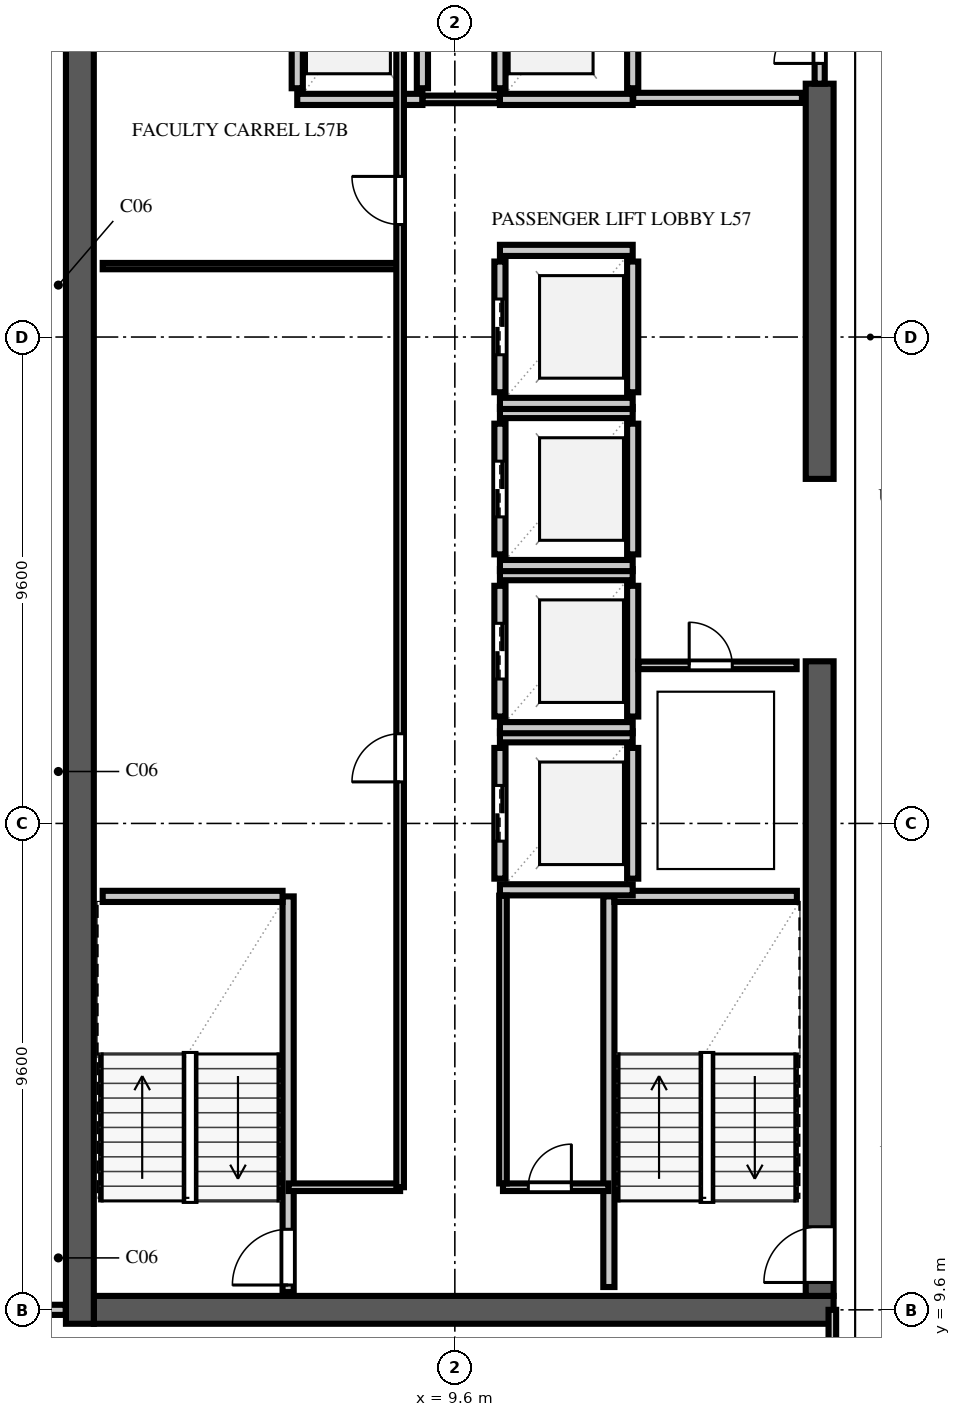
"""IFC4 building model, lengths in metres.
Left out: names, types, materials, properties, quantities, classifications, styles, units other than length and angle.
Written with IfcOpenShell. Run it as: python <this file> out.ifc"""

import sys

from ifc_helpers import new_model, si_unit, direction, frame, frame_2d, origin, place, context, subcontext, project, spatial, rectangle, extrude, element, fill, save


model = new_model("IFC4")
c1 = context("Model", 3, precision=1e-05, world=origin(), true_north=direction((0.0, 1.0)))
c2 = subcontext(c1, "Body", "Model", "MODEL_VIEW")
j1 = project(units=[si_unit("LENGTHUNIT", "METRE"), si_unit("PLANEANGLEUNIT", "RADIAN")], contexts=[c1])
p1 = place(None, origin())
s1 = spatial("IfcSite", under=j1, at=p1, CompositionType="ELEMENT")
p2 = place(p1, origin())
s2 = spatial("IfcBuilding", under=s1, at=p2, CompositionType="ELEMENT")
p3 = place(p2, frame((0.0, 0.0, 225.6)))
s3 = spatial("IfcBuildingStorey", under=s2, at=p3, CompositionType="ELEMENT", Elevation=225.6)
p4 = place(p3, frame((2.475, 9.6, 0.0), z_axis=(0.0, 0.0, 1.0), x_axis=(1.0, 0.0, 0.0)))
e1 = element("IfcWall", 1, at=p4, inside=s3, PredefinedType="SHEAR", context=c2, shape_type="SweptSolid", body=[
    extrude(rectangle(XDim=14.6, YDim=0.55, at=frame_2d((7.3, 0.0))), origin(), (0.0, 0.0, 1.0), 3.54),
])
p5 = place(p3, frame((2.2, 9.325, 0.0), z_axis=(0.0, 0.0, 1.0), x_axis=(0.0, 1.0, 0.0)))
e2 = element("IfcWall", 2, at=p5, inside=s3, PredefinedType="SHEAR", context=c2, shape_type="SweptSolid", body=[
    extrude(rectangle(XDim=38.95, YDim=0.55, at=frame_2d((19.475, 0.0))), origin(), (0.0, 0.0, 1.0), 3.54),
])
p6 = place(p3, frame((16.8, 9.875, 0.0), z_axis=(0.0, 0.0, 1.0), x_axis=(0.0, 1.0, 0.0)))
e3 = element("IfcWall", 3, at=p6, inside=s3, PredefinedType="SHEAR", context=c2, shape_type="SweptSolid", body=[
    extrude(rectangle(XDim=12.525, YDim=0.55, at=frame_2d((6.262, 0.0))), origin(), (0.0, 0.0, 1.0), 3.54),
])
p7 = place(p6, frame((0.265, 0.0, 0.0)))
e4 = element("IfcOpeningElement", 4, at=p7, cuts=e3, PredefinedType="OPENING", context=c2, shape_type="SweptSolid", body=[
    extrude(rectangle(XDim=1.1, YDim=2.2, at=frame_2d((0.55, 1.1))), frame((0.0, 0.287, 0.0), z_axis=(0.0, -1.0, 0.0), x_axis=(1.0, 0.0, 0.0)), (0.0, 0.0, 1.0), 0.574),
])
p8 = place(p3, frame((16.8, 26.0, 0.0), z_axis=(0.0, 0.0, 1.0), x_axis=(0.0, 1.0, 0.0)))
e5 = element("IfcWall", 5, at=p8, inside=s3, PredefinedType="SHEAR", context=c2, shape_type="SweptSolid", body=[
    extrude(rectangle(XDim=7.8, YDim=0.55, at=frame_2d((3.9, 0.0))), origin(), (0.0, 0.0, 1.0), 3.54),
])
p9 = place(p3, frame((6.31, 9.95, 0.0), z_axis=(0.0, 0.0, 1.0), x_axis=(0.0, 1.0, 0.0)))
e6 = element("IfcWall", 6, at=p9, inside=s3, PredefinedType="SOLIDWALL", context=c2, shape_type="SweptSolid", body=[
    extrude(rectangle(XDim=7.81, YDim=0.22, at=frame_2d((3.905, 0.0))), origin(), (0.0, 0.0, 1.0), 3.54),
])
p10 = place(p9, frame((0.14, 0.0, 0.0)))
e7 = element("IfcOpeningElement", 7, at=p10, cuts=e6, PredefinedType="OPENING", context=c2, shape_type="SweptSolid", body=[
    extrude(rectangle(XDim=1.1, YDim=2.2, at=frame_2d((0.55, 1.1))), frame((0.0, 0.122, 0.0), z_axis=(0.0, -1.0, 0.0), x_axis=(1.0, 0.0, 0.0)), (0.0, 0.0, 1.0), 0.244),
])
p11 = place(p3, frame((2.65, 17.76, 0.0), z_axis=(0.0, 0.0, 1.0), x_axis=(1.0, 0.0, 0.0)))
e8 = element("IfcWall", 8, at=p11, inside=s3, PredefinedType="SOLIDWALL", context=c2, shape_type="SweptSolid", body=[
    extrude(rectangle(XDim=3.55, YDim=0.22, at=frame_2d((1.775, 0.0))), origin(), (0.0, 0.0, 1.0), 3.54),
])
p12 = place(p3, frame((12.64, 10.05, 0.0), z_axis=(0.0, 0.0, 1.0), x_axis=(0.0, 1.0, 0.0)))
e9 = element("IfcWall", 9, at=p12, inside=s3, PredefinedType="SOLIDWALL", context=c2, shape_type="SweptSolid", body=[
    extrude(rectangle(XDim=7.71, YDim=0.22, at=frame_2d((3.855, 0.0))), origin(), (0.0, 0.0, 1.0), 3.54),
])
p13 = place(p3, frame((12.75, 17.76, 0.0), z_axis=(0.0, 0.0, 1.0), x_axis=(1.0, 0.0, 0.0)))
e10 = element("IfcWall", 10, at=p13, inside=s3, PredefinedType="SOLIDWALL", context=c2, shape_type="SweptSolid", body=[
    extrude(rectangle(XDim=3.6, YDim=0.22, at=frame_2d((1.8, 0.0))), origin(), (0.0, 0.0, 1.0), 3.54),
])
p14 = place(p3, frame((10.49, 18.11, 0.0), z_axis=(0.0, 0.0, 1.0), x_axis=(0.0, 1.0, 0.0)))
e11 = element("IfcWall", 11, at=p14, inside=s3, PredefinedType="SOLIDWALL", context=c2, shape_type="SweptSolid", body=[
    extrude(rectangle(XDim=2.58, YDim=0.22, at=frame_2d((1.29, 0.0))), origin(), (0.0, 0.0, 1.0), 3.54),
])
p15 = place(p14, frame((0.74, 0.0, 0.0)))
e12 = element("IfcOpeningElement", 12, at=p15, cuts=e11, PredefinedType="OPENING", context=c2, shape_type="SweptSolid", body=[
    extrude(rectangle(XDim=1.1, YDim=2.2, at=frame_2d((0.55, 1.1))), frame((0.0, 0.122, 0.0), z_axis=(0.0, -1.0, 0.0), x_axis=(1.0, 0.0, 0.0)), (0.0, 0.0, 1.0), 0.244),
])
p16 = place(p3, frame((13.11, 18.11, 0.0), z_axis=(0.0, 0.0, 1.0), x_axis=(0.0, 1.0, 0.0)))
e13 = element("IfcWall", 13, at=p16, inside=s3, PredefinedType="SOLIDWALL", context=c2, shape_type="SweptSolid", body=[
    extrude(rectangle(XDim=2.58, YDim=0.22, at=frame_2d((1.29, 0.0))), origin(), (0.0, 0.0, 1.0), 3.54),
])
for number, where, z_axis, x_axis in (
    (14, (10.49, 17.89, 0.0), (0.0, 0.0, 1.0), (1.0, 0.0, 0.0)),
    (15, (10.49, 20.91, 0.0), (0.0, 0.0, 1.0), (1.0, 0.0, 0.0)),
):
    element("IfcWall", number, at=place(p3, frame(where, z_axis=z_axis, x_axis=x_axis)), inside=s3, PredefinedType="SOLIDWALL", context=c2, shape_type="SweptSolid", body=[
        extrude(rectangle(XDim=2.62, YDim=0.22, at=frame_2d((1.31, 0.0))), origin(), (0.0, 0.0, 1.0), 3.54),
    ])
p17 = place(p3, frame((10.49, 21.31, 0.0), z_axis=(0.0, 0.0, 1.0), x_axis=(0.0, 1.0, 0.0)))
e16 = element("IfcWall", 16, at=p17, inside=s3, PredefinedType="SOLIDWALL", context=c2, shape_type="SweptSolid", body=[
    extrude(rectangle(XDim=2.58, YDim=0.22, at=frame_2d((1.29, 0.0))), origin(), (0.0, 0.0, 1.0), 3.54),
])
p18 = place(p17, frame((0.74, 0.0, 0.0)))
e17 = element("IfcOpeningElement", 17, at=p18, cuts=e16, PredefinedType="OPENING", context=c2, shape_type="SweptSolid", body=[
    extrude(rectangle(XDim=1.1, YDim=2.2, at=frame_2d((0.55, 1.1))), frame((0.0, 0.122, 0.0), z_axis=(0.0, -1.0, 0.0), x_axis=(1.0, 0.0, 0.0)), (0.0, 0.0, 1.0), 0.244),
])
p19 = place(p3, frame((13.11, 21.31, 0.0), z_axis=(0.0, 0.0, 1.0), x_axis=(0.0, 1.0, 0.0)))
e18 = element("IfcWall", 18, at=p19, inside=s3, PredefinedType="SOLIDWALL", context=c2, shape_type="SweptSolid", body=[
    extrude(rectangle(XDim=2.58, YDim=0.22, at=frame_2d((1.29, 0.0))), origin(), (0.0, 0.0, 1.0), 3.54),
])
for number, where, z_axis, x_axis in (
    (19, (10.49, 21.09, 0.0), (0.0, 0.0, 1.0), (1.0, 0.0, 0.0)),
    (20, (10.49, 24.11, 0.0), (0.0, 0.0, 1.0), (1.0, 0.0, 0.0)),
):
    element("IfcWall", number, at=place(p3, frame(where, z_axis=z_axis, x_axis=x_axis)), inside=s3, PredefinedType="SOLIDWALL", context=c2, shape_type="SweptSolid", body=[
        extrude(rectangle(XDim=2.62, YDim=0.22, at=frame_2d((1.31, 0.0))), origin(), (0.0, 0.0, 1.0), 3.54),
    ])
p20 = place(p3, frame((10.49, 24.51, 0.0), z_axis=(0.0, 0.0, 1.0), x_axis=(0.0, 1.0, 0.0)))
e21 = element("IfcWall", 21, at=p20, inside=s3, PredefinedType="SOLIDWALL", context=c2, shape_type="SweptSolid", body=[
    extrude(rectangle(XDim=2.58, YDim=0.22, at=frame_2d((1.29, 0.0))), origin(), (0.0, 0.0, 1.0), 3.54),
])
p21 = place(p20, frame((0.74, 0.0, 0.0)))
e22 = element("IfcOpeningElement", 22, at=p21, cuts=e21, PredefinedType="OPENING", context=c2, shape_type="SweptSolid", body=[
    extrude(rectangle(XDim=1.1, YDim=2.2, at=frame_2d((0.55, 1.1))), frame((0.0, 0.122, 0.0), z_axis=(0.0, -1.0, 0.0), x_axis=(1.0, 0.0, 0.0)), (0.0, 0.0, 1.0), 0.244),
])
p22 = place(p3, frame((13.11, 24.51, 0.0), z_axis=(0.0, 0.0, 1.0), x_axis=(0.0, 1.0, 0.0)))
e23 = element("IfcWall", 23, at=p22, inside=s3, PredefinedType="SOLIDWALL", context=c2, shape_type="SweptSolid", body=[
    extrude(rectangle(XDim=2.58, YDim=0.22, at=frame_2d((1.29, 0.0))), origin(), (0.0, 0.0, 1.0), 3.54),
])
for number, where, z_axis, x_axis in (
    (24, (10.49, 24.29, 0.0), (0.0, 0.0, 1.0), (1.0, 0.0, 0.0)),
    (25, (10.49, 27.31, 0.0), (0.0, 0.0, 1.0), (1.0, 0.0, 0.0)),
):
    element("IfcWall", number, at=place(p3, frame(where, z_axis=z_axis, x_axis=x_axis)), inside=s3, PredefinedType="SOLIDWALL", context=c2, shape_type="SweptSolid", body=[
        extrude(rectangle(XDim=2.62, YDim=0.22, at=frame_2d((1.31, 0.0))), origin(), (0.0, 0.0, 1.0), 3.54),
    ])
p23 = place(p3, frame((10.49, 27.71, 0.0), z_axis=(0.0, 0.0, 1.0), x_axis=(0.0, 1.0, 0.0)))
e26 = element("IfcWall", 26, at=p23, inside=s3, PredefinedType="SOLIDWALL", context=c2, shape_type="SweptSolid", body=[
    extrude(rectangle(XDim=2.58, YDim=0.22, at=frame_2d((1.29, 0.0))), origin(), (0.0, 0.0, 1.0), 3.54),
])
p24 = place(p23, frame((0.74, 0.0, 0.0)))
e27 = element("IfcOpeningElement", 27, at=p24, cuts=e26, PredefinedType="OPENING", context=c2, shape_type="SweptSolid", body=[
    extrude(rectangle(XDim=1.1, YDim=2.2, at=frame_2d((0.55, 1.1))), frame((0.0, 0.122, 0.0), z_axis=(0.0, -1.0, 0.0), x_axis=(1.0, 0.0, 0.0)), (0.0, 0.0, 1.0), 0.244),
])
p25 = place(p3, frame((13.11, 27.71, 0.0), z_axis=(0.0, 0.0, 1.0), x_axis=(0.0, 1.0, 0.0)))
e28 = element("IfcWall", 28, at=p25, inside=s3, PredefinedType="SOLIDWALL", context=c2, shape_type="SweptSolid", body=[
    extrude(rectangle(XDim=2.58, YDim=0.22, at=frame_2d((1.29, 0.0))), origin(), (0.0, 0.0, 1.0), 3.54),
])
for number, where, z_axis, x_axis in (
    (29, (10.49, 27.49, 0.0), (0.0, 0.0, 1.0), (1.0, 0.0, 0.0)),
    (30, (10.49, 30.51, 0.0), (0.0, 0.0, 1.0), (1.0, 0.0, 0.0)),
):
    element("IfcWall", number, at=place(p3, frame(where, z_axis=z_axis, x_axis=x_axis)), inside=s3, PredefinedType="SOLIDWALL", context=c2, shape_type="SweptSolid", body=[
        extrude(rectangle(XDim=2.62, YDim=0.22, at=frame_2d((1.31, 0.0))), origin(), (0.0, 0.0, 1.0), 3.54),
    ])
for number, where, z_axis, x_axis in (
    (31, (6.49, 33.71, 0.0), (0.0, 0.0, 1.0), (0.0, 1.0, 0.0)),
    (32, (8.96, 33.71, 0.0), (0.0, 0.0, 1.0), (0.0, 1.0, 0.0)),
):
    element("IfcWall", number, at=place(p3, frame(where, z_axis=z_axis, x_axis=x_axis)), inside=s3, PredefinedType="SOLIDWALL", context=c2, shape_type="SweptSolid", body=[
        extrude(rectangle(XDim=2.78, YDim=0.22, at=frame_2d((1.39, 0.0))), origin(), (0.0, 0.0, 1.0), 3.54),
    ])
p26 = place(p3, frame((6.49, 33.49, 0.0), z_axis=(0.0, 0.0, 1.0), x_axis=(1.0, 0.0, 0.0)))
e33 = element("IfcWall", 33, at=p26, inside=s3, PredefinedType="SOLIDWALL", context=c2, shape_type="SweptSolid", body=[
    extrude(rectangle(XDim=2.47, YDim=0.22, at=frame_2d((1.235, 0.0))), origin(), (0.0, 0.0, 1.0), 3.54),
])
for number, where, z_axis, x_axis in (
    (34, (10.49, 33.71, 0.0), (0.0, 0.0, 1.0), (0.0, 1.0, 0.0)),
    (35, (13.11, 33.71, 0.0), (0.0, 0.0, 1.0), (0.0, 1.0, 0.0)),
):
    element("IfcWall", number, at=place(p3, frame(where, z_axis=z_axis, x_axis=x_axis)), inside=s3, PredefinedType="SOLIDWALL", context=c2, shape_type="SweptSolid", body=[
        extrude(rectangle(XDim=2.78, YDim=0.22, at=frame_2d((1.39, 0.0))), origin(), (0.0, 0.0, 1.0), 3.54),
    ])
p27 = place(p3, frame((10.49, 33.49, 0.0), z_axis=(0.0, 0.0, 1.0), x_axis=(1.0, 0.0, 0.0)))
e36 = element("IfcWall", 36, at=p27, inside=s3, PredefinedType="SOLIDWALL", context=c2, shape_type="SweptSolid", body=[
    extrude(rectangle(XDim=2.62, YDim=0.22, at=frame_2d((1.31, 0.0))), origin(), (0.0, 0.0, 1.0), 3.54),
])
p28 = place(p3, frame((13.12, 33.52, 0.0), z_axis=(0.0, 0.0, 1.0), x_axis=(1.0, 0.0, 0.0)))
e37 = element("IfcWall", 37, at=p28, inside=s3, PredefinedType="SOLIDWALL", context=c2, shape_type="SweptSolid", body=[
    extrude(rectangle(XDim=3.33, YDim=0.2, at=frame_2d((1.665, 0.0))), origin(), (0.0, 0.0, 1.0), 3.54),
])
p29 = place(p3, frame((16.8, 33.8, 0.0), z_axis=(0.0, 0.0, 1.0), x_axis=(0.0, 1.0, 0.0)))
e38 = element("IfcWall", 38, at=p29, inside=s3, PredefinedType="SOLIDWALL", context=c2, shape_type="SweptSolid", body=[
    extrude(rectangle(XDim=2.6, YDim=0.2, at=frame_2d((1.3, 0.0))), origin(), (0.0, 0.0, 1.0), 3.54),
])
p30 = place(p29, frame((0.4, 0.0, 0.0)))
e39 = element("IfcOpeningElement", 39, at=p30, cuts=e38, PredefinedType="OPENING", context=c2, shape_type="SweptSolid", body=[
    extrude(rectangle(XDim=1.8, YDim=2.2, at=frame_2d((0.9, 1.1))), frame((0.0, 0.112, 0.0), z_axis=(0.0, -1.0, 0.0), x_axis=(1.0, 0.0, 0.0)), (0.0, 0.0, 1.0), 0.224),
])
p31 = place(p3, frame((8.965, 33.49, 0.0), z_axis=(0.0, 0.0, 1.0), x_axis=(1.0, 0.0, 0.0)))
e40 = element("IfcWall", 40, at=p31, inside=s3, PredefinedType="PARTITIONING", context=c2, shape_type="SweptSolid", body=[
    extrude(rectangle(XDim=1.52, YDim=0.15, at=frame_2d((0.76, 0.0))), origin(), (0.0, 0.0, 1.0), 3.54),
])
p32 = place(p3, frame((10.55, 12.02, 0.0), z_axis=(0.0, 0.0, 1.0), x_axis=(1.0, 0.0, 0.0)))
e41 = element("IfcWall", 41, at=p32, inside=s3, PredefinedType="PARTITIONING", context=c2, shape_type="SweptSolid", body=[
    extrude(rectangle(XDim=2.08, YDim=0.15, at=frame_2d((1.04, 0.0))), origin(), (0.0, 0.0, 1.0), 3.54),
])
p33 = place(p32, frame((0.5, 0.0, 0.0)))
e42 = element("IfcOpeningElement", 42, at=p33, cuts=e41, PredefinedType="OPENING", context=c2, shape_type="SweptSolid", body=[
    extrude(rectangle(XDim=0.85, YDim=2.1, at=frame_2d((0.425, 1.05))), frame((0.0, 0.087, 0.0), z_axis=(0.0, -1.0, 0.0), x_axis=(1.0, 0.0, 0.0)), (0.0, 0.0, 1.0), 0.174),
])
p34 = place(p3, frame((10.55, 12.095, 0.0), z_axis=(0.0, 0.0, 1.0), x_axis=(0.0, 1.0, 0.0)))
e43 = element("IfcWall", 43, at=p34, inside=s3, PredefinedType="PARTITIONING", context=c2, shape_type="SweptSolid", body=[
    extrude(rectangle(XDim=5.68, YDim=0.15, at=frame_2d((2.84, 0.0))), origin(), (0.0, 0.0, 1.0), 3.54),
])
p35 = place(p3, frame((13.225, 22.32, 0.0), z_axis=(0.0, 0.0, 1.0), x_axis=(1.0, 0.0, 0.0)))
e44 = element("IfcWall", 44, at=p35, inside=s3, PredefinedType="PARTITIONING", context=c2, shape_type="SweptSolid", body=[
    extrude(rectangle(XDim=3.12, YDim=0.15, at=frame_2d((1.56, 0.0))), origin(), (0.0, 0.0, 1.0), 3.54),
])
p36 = place(p35, frame((1.0, 0.0, 0.0)))
e45 = element("IfcOpeningElement", 45, at=p36, cuts=e44, PredefinedType="OPENING", context=c2, shape_type="SweptSolid", body=[
    extrude(rectangle(XDim=0.85, YDim=2.1, at=frame_2d((0.425, 1.05))), frame((0.0, 0.087, 0.0), z_axis=(0.0, -1.0, 0.0), x_axis=(1.0, 0.0, 0.0)), (0.0, 0.0, 1.0), 0.174),
])
p37 = place(p3, frame((6.32, 12.02, 0.0), z_axis=(0.0, 0.0, 1.0), x_axis=(1.0, 0.0, 0.0)))
e46 = element("IfcWall", 46, at=p37, inside=s3, PredefinedType="PARTITIONING", context=c2, shape_type="SweptSolid", body=[
    extrude(rectangle(XDim=2.2, YDim=0.15, at=frame_2d((1.1, 0.0))), origin(), (0.0, 0.0, 1.0), 3.54),
])
p38 = place(p3, frame((2.65, 30.2, 0.0), z_axis=(0.0, 0.0, 1.0), x_axis=(1.0, 0.0, 0.0)))
e47 = element("IfcWall", 47, at=p38, inside=s3, PredefinedType="PARTITIONING", context=c2, shape_type="SweptSolid", body=[
    extrude(rectangle(XDim=5.87, YDim=0.125, at=frame_2d((2.935, 0.0))), origin(), (0.0, 0.0, 1.0), 3.54),
])
p39 = place(p3, frame((8.52, 12.02, 0.0), z_axis=(0.0, 0.0, 1.0), x_axis=(0.0, 1.0, 0.0)))
e48 = element("IfcWall", 48, at=p39, inside=s3, PredefinedType="PARTITIONING", context=c2, shape_type="SweptSolid", body=[
    extrude(rectangle(XDim=24.76, YDim=0.15, at=frame_2d((12.38, 0.0))), origin(), (0.0, 0.0, 1.0), 3.54),
])
p40 = place(p39, frame((8.0, 0.0, 0.0)))
e49 = element("IfcOpeningElement", 49, at=p40, cuts=e48, PredefinedType="OPENING", context=c2, shape_type="SweptSolid", body=[
    extrude(rectangle(XDim=0.95, YDim=2.15, at=frame_2d((0.475, 1.075))), frame((0.0, 0.087, 0.0), z_axis=(0.0, -1.0, 0.0), x_axis=(1.0, 0.0, 0.0)), (0.0, 0.0, 1.0), 0.174),
])
p41 = place(p39, frame((19.0, 0.0, 0.0)))
e50 = element("IfcOpeningElement", 50, at=p41, cuts=e48, PredefinedType="OPENING", context=c2, shape_type="SweptSolid", body=[
    extrude(rectangle(XDim=0.95, YDim=2.15, at=frame_2d((0.475, 1.075))), frame((0.0, 0.087, 0.0), z_axis=(0.0, -1.0, 0.0), x_axis=(1.0, 0.0, 0.0)), (0.0, 0.0, 1.0), 0.174),
])
p42 = place(p3, frame((0.85, 9.6, 0.0), z_axis=(0.0, 0.0, 1.0), x_axis=(1.0, 0.0, 0.0)))
e51 = element("IfcWall", 51, at=p42, inside=s3, PredefinedType="SOLIDWALL", context=c2, shape_type="SweptSolid", body=[
    extrude(rectangle(XDim=1.07, YDim=0.2, at=frame_2d((0.535, 0.0))), origin(), (0.0, 0.0, 1.0), 2.923),
])
p43 = place(p3, frame((17.05, 0.22, 0.0), z_axis=(0.0, 0.0, 1.0), x_axis=(0.0, 1.0, 0.0)))
e52 = element("IfcWall", 52, at=p43, inside=s3, PredefinedType="PARTITIONING", context=c2, shape_type="SweptSolid", body=[
    extrude(rectangle(XDim=9.38, YDim=0.15, at=frame_2d((4.69, 0.0))), origin(), (0.0, 0.0, 1.0), 3.54),
])
p44 = place(p43, frame((5.58, 0.0, 0.0)))
e53 = element("IfcOpeningElement", 53, at=p44, cuts=e52, PredefinedType="OPENING", context=c2, shape_type="SweptSolid", body=[
    extrude(rectangle(XDim=1.0, YDim=2.2, at=frame_2d((0.5, 1.1))), frame((0.0, 0.087, 0.0), z_axis=(0.0, -1.0, 0.0), x_axis=(1.0, 0.0, 0.0)), (0.0, 0.0, 1.0), 0.174),
])
p45 = place(p10, origin())
e54 = element("IfcDoor", 54, at=p45, inside=s3, OperationType="SINGLE_SWING_LEFT", PredefinedType="DOOR", context=c2, shape_type="SweptSolid", body=[
    extrude(rectangle(XDim=1.1, YDim=2.2, at=frame_2d((0.55, 1.1))), frame((0.0, 0.025, 0.0), z_axis=(0.0, -1.0, 0.0), x_axis=(1.0, 0.0, 0.0)), (0.0, 0.0, 1.0), 0.05),
])
fill(e7, e54)
p46 = place(p7, origin())
e55 = element("IfcDoor", 55, at=p46, inside=s3, OperationType="SINGLE_SWING_LEFT", PredefinedType="DOOR", context=c2, shape_type="SweptSolid", body=[
    extrude(rectangle(XDim=1.1, YDim=2.2, at=frame_2d((0.55, 1.1))), frame((0.0, 0.025, 0.0), z_axis=(0.0, -1.0, 0.0), x_axis=(1.0, 0.0, 0.0)), (0.0, 0.0, 1.0), 0.05),
])
fill(e4, e55)
p47 = place(p15, origin())
e56 = element("IfcDoor", 56, at=p47, inside=s3, OperationType="DOUBLE_DOOR_SLIDING", PredefinedType="DOOR", context=c2, shape_type="SweptSolid", body=[
    extrude(rectangle(XDim=1.1, YDim=2.2, at=frame_2d((0.55, 1.1))), frame((0.0, 0.025, 0.0), z_axis=(0.0, -1.0, 0.0), x_axis=(1.0, 0.0, 0.0)), (0.0, 0.0, 1.0), 0.05),
])
fill(e12, e56)
p48 = place(p18, origin())
e57 = element("IfcDoor", 57, at=p48, inside=s3, OperationType="DOUBLE_DOOR_SLIDING", PredefinedType="DOOR", context=c2, shape_type="SweptSolid", body=[
    extrude(rectangle(XDim=1.1, YDim=2.2, at=frame_2d((0.55, 1.1))), frame((0.0, 0.025, 0.0), z_axis=(0.0, -1.0, 0.0), x_axis=(1.0, 0.0, 0.0)), (0.0, 0.0, 1.0), 0.05),
])
fill(e17, e57)
p49 = place(p21, origin())
e58 = element("IfcDoor", 58, at=p49, inside=s3, OperationType="DOUBLE_DOOR_SLIDING", PredefinedType="DOOR", context=c2, shape_type="SweptSolid", body=[
    extrude(rectangle(XDim=1.1, YDim=2.2, at=frame_2d((0.55, 1.1))), frame((0.0, 0.025, 0.0), z_axis=(0.0, -1.0, 0.0), x_axis=(1.0, 0.0, 0.0)), (0.0, 0.0, 1.0), 0.05),
])
fill(e22, e58)
p50 = place(p24, origin())
e59 = element("IfcDoor", 59, at=p50, inside=s3, OperationType="DOUBLE_DOOR_SLIDING", PredefinedType="DOOR", context=c2, shape_type="SweptSolid", body=[
    extrude(rectangle(XDim=1.1, YDim=2.2, at=frame_2d((0.55, 1.1))), frame((0.0, 0.025, 0.0), z_axis=(0.0, -1.0, 0.0), x_axis=(1.0, 0.0, 0.0)), (0.0, 0.0, 1.0), 0.05),
])
fill(e27, e59)
p51 = place(p30, origin())
e60 = element("IfcDoor", 60, at=p51, inside=s3, OperationType="DOUBLE_DOOR_SINGLE_SWING", PredefinedType="DOOR", context=c2, shape_type="SweptSolid", body=[
    extrude(rectangle(XDim=1.8, YDim=2.2, at=frame_2d((0.9, 1.1))), frame((0.0, 0.025, 0.0), z_axis=(0.0, -1.0, 0.0), x_axis=(1.0, 0.0, 0.0)), (0.0, 0.0, 1.0), 0.05),
])
fill(e39, e60)
p52 = place(p33, origin())
e61 = element("IfcDoor", 61, at=p52, inside=s3, OperationType="SINGLE_SWING_RIGHT", PredefinedType="DOOR", context=c2, shape_type="SweptSolid", body=[
    extrude(rectangle(XDim=0.85, YDim=2.1, at=frame_2d((0.425, 1.05))), frame((0.0, 0.025, 0.0), z_axis=(0.0, -1.0, 0.0), x_axis=(1.0, 0.0, 0.0)), (0.0, 0.0, 1.0), 0.05),
])
fill(e42, e61)
p53 = place(p36, origin())
e62 = element("IfcDoor", 62, at=p53, inside=s3, OperationType="SINGLE_SWING_LEFT", PredefinedType="DOOR", context=c2, shape_type="SweptSolid", body=[
    extrude(rectangle(XDim=0.85, YDim=2.1, at=frame_2d((0.425, 1.05))), frame((0.0, 0.025, 0.0), z_axis=(0.0, -1.0, 0.0), x_axis=(1.0, 0.0, 0.0)), (0.0, 0.0, 1.0), 0.05),
])
fill(e45, e62)
p54 = place(p40, origin())
e63 = element("IfcDoor", 63, at=p54, inside=s3, OperationType="SINGLE_SWING_LEFT", PredefinedType="DOOR", context=c2, shape_type="SweptSolid", body=[
    extrude(rectangle(XDim=0.95, YDim=2.15, at=frame_2d((0.475, 1.075))), frame((0.0, 0.025, 0.0), z_axis=(0.0, -1.0, 0.0), x_axis=(1.0, 0.0, 0.0)), (0.0, 0.0, 1.0), 0.05),
])
fill(e49, e63)
p55 = place(p41, origin())
e64 = element("IfcDoor", 64, at=p55, inside=s3, OperationType="SINGLE_SWING_RIGHT", PredefinedType="DOOR", context=c2, shape_type="SweptSolid", body=[
    extrude(rectangle(XDim=0.95, YDim=2.15, at=frame_2d((0.475, 1.075))), frame((0.0, 0.025, 0.0), z_axis=(0.0, -1.0, 0.0), x_axis=(1.0, 0.0, 0.0)), (0.0, 0.0, 1.0), 0.05),
])
fill(e50, e64)
save(model, sys.argv[1])
